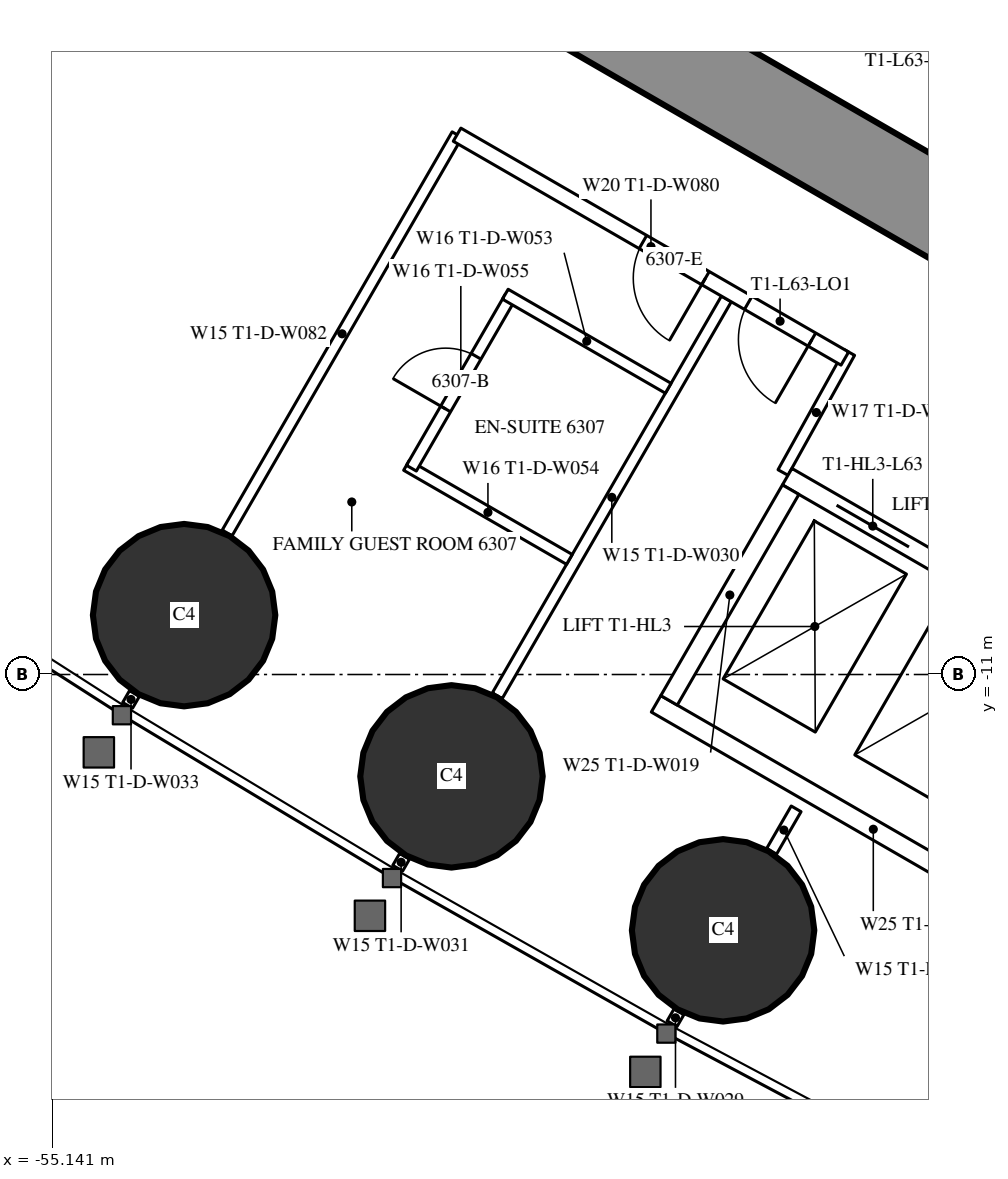
"""IFC4 building model, lengths in metres.
Left out: names, types, materials, properties, quantities, classifications, styles, units other than length and angle.
Written with IfcOpenShell. Run it as: python <this file> out.ifc"""

import sys

from ifc_helpers import new_model, si_unit, direction, frame, frame_2d, origin, origin_2d, place, context, subcontext, project, spatial, rectangle, circle, extrude, element, fill, save


model = new_model("IFC4")
c1 = context("Model", 3, precision=1e-05, world=origin(), true_north=direction((0.0, 1.0)))
c2 = subcontext(c1, "Body", "Model", "MODEL_VIEW")
j1 = project(units=[si_unit("LENGTHUNIT", "METRE"), si_unit("PLANEANGLEUNIT", "RADIAN")], contexts=[c1])
p1 = place(None, origin())
s1 = spatial("IfcSite", under=j1, at=p1, CompositionType="ELEMENT")
p2 = place(p1, origin())
s2 = spatial("IfcBuilding", under=s1, at=p2, CompositionType="ELEMENT")
p3 = place(p2, frame((0.0, 0.0, 236.9)))
s3 = spatial("IfcBuildingStorey", under=s2, at=p3, CompositionType="ELEMENT", Elevation=236.9)
for number, where, z_axis, x_axis in (
    (1, (-53.408, -10.219, 0.0), (0.0, 0.0, 1.0), (1.0, 0.0, 0.0)),
    (2, (-49.89, -12.34, 0.0), (0.0, 0.0, 1.0), (1.0, 0.0, 0.0)),
    (3, (-46.317, -14.365, 0.0), (0.0, 0.0, 1.0), (1.0, 0.0, 0.0)),
):
    element("IfcColumn", number, at=place(p3, frame(where, z_axis=z_axis, x_axis=x_axis)), inside=s3, PredefinedType="COLUMN", context=c2, shape_type="SweptSolid", body=[
        extrude(circle(Radius=1.2, at=origin_2d()), origin(), (0.0, 0.0, 1.0), 3.6),
    ])
p4 = place(p3, frame((-27.2, -14.3, 0.0), z_axis=(0.0, 0.0, 1.0), x_axis=(-0.866024021859, 0.500002393557, 0.0)))
e4 = element("IfcWall", 4, at=p4, inside=s3, PredefinedType="SHEAR", context=c2, shape_type="SweptSolid", body=[
    extrude(rectangle(XDim=27.907, YDim=1.2, at=frame_2d((13.954, 0.0))), origin(), (0.0, 0.0, 1.0), 3.6),
])
p5 = place(p4, frame((4.6, 0.0, 0.0)))
e5 = element("IfcOpeningElement", 5, at=p5, cuts=e4, PredefinedType="OPENING", context=c2, shape_type="SweptSolid", body=[
    extrude(rectangle(XDim=1.0, YDim=2.2, at=frame_2d((0.5, 1.1))), frame((0.0, 0.61, 0.0), z_axis=(0.0, -1.0, 0.0), x_axis=(1.0, 0.0, 0.0)), (0.0, 0.0, 1.0), 1.22),
])
p6 = place(p4, frame((13.395, 0.0, 0.0)))
e6 = element("IfcOpeningElement", 6, at=p6, cuts=e4, PredefinedType="OPENING", context=c2, shape_type="SweptSolid", body=[
    extrude(rectangle(XDim=1.8, YDim=2.2, at=frame_2d((0.9, 1.1))), frame((0.0, 0.61, 0.0), z_axis=(0.0, -1.0, 0.0), x_axis=(1.0, 0.0, 0.0)), (0.0, 0.0, 1.0), 1.22),
])
p7 = place(p3, frame((-46.898, -15.439, 0.0), z_axis=(0.0, 0.0, 1.0), x_axis=(-0.500232303069, -0.865891241997, 0.0)))
e7 = element("IfcWall", 7, at=p7, inside=s3, PredefinedType="PARTITIONING", context=c2, shape_type="SweptSolid", body=[
    extrude(rectangle(XDim=0.18, YDim=0.15, at=frame_2d((0.09, 0.0))), origin(), (0.0, 0.0, 1.0), 2.45),
])
p8 = place(p3, frame((-46.274, -6.059, 0.0), z_axis=(0.0, 0.0, 1.0), x_axis=(-0.500020471368, -0.866013584312, 0.0)))
e8 = element("IfcWall", 8, at=p8, inside=s3, PredefinedType="PARTITIONING", context=c2, shape_type="SweptSolid", body=[
    extrude(rectangle(XDim=6.028, YDim=0.15, at=frame_2d((3.014, 0.0))), origin(), (0.0, 0.0, 1.0), 2.45),
])
p9 = place(p3, frame((-50.508, -13.392, 0.0), z_axis=(0.0, 0.0, 1.0), x_axis=(-0.499644091975, -0.866230789891, 0.0)))
e9 = element("IfcWall", 9, at=p9, inside=s3, PredefinedType="PARTITIONING", context=c2, shape_type="SweptSolid", body=[
    extrude(rectangle(XDim=0.18, YDim=0.15, at=frame_2d((0.09, 0.0))), origin(), (0.0, 0.0, 1.0), 2.45),
])
p10 = place(p3, frame((-49.816, -3.898, 0.0), z_axis=(0.0, 0.0, 1.0), x_axis=(-0.500001913541, -0.866024298998, 0.0)))
e10 = element("IfcWall", 10, at=p10, inside=s3, PredefinedType="PARTITIONING", context=c2, shape_type="SweptSolid", body=[
    extrude(rectangle(XDim=6.05, YDim=0.15, at=frame_2d((3.025, 0.0))), origin(), (0.0, 0.0, 1.0), 2.45),
])
p11 = place(p3, frame((-54.061, -11.25, 0.0), z_axis=(0.0, 0.0, 1.0), x_axis=(-0.500391173478, -0.865799441849, 0.0)))
e11 = element("IfcWall", 11, at=p11, inside=s3, PredefinedType="PARTITIONING", context=c2, shape_type="SweptSolid", body=[
    extrude(rectangle(XDim=0.179, YDim=0.15, at=frame_2d((0.089, 0.0))), origin(), (0.0, 0.0, 1.0), 2.45),
])
p12 = place(p3, frame((-45.356, -12.767, 0.0), z_axis=(0.0, 0.0, 1.0), x_axis=(-0.499886366516, -0.866091000168, 0.0)))
e12 = element("IfcWall", 12, at=p12, inside=s3, PredefinedType="PARTITIONING", context=c2, shape_type="SweptSolid", body=[
    extrude(rectangle(XDim=0.645, YDim=0.15, at=frame_2d((0.322, 0.0))), origin(), (0.0, 0.0, 1.0), 3.35),
])
p13 = place(p3, frame((-44.652, -6.764, 0.0), z_axis=(0.0, 0.0, 1.0), x_axis=(-0.485424724123, -0.874278466629, 0.0)))
e13 = element("IfcWall", 13, at=p13, inside=s3, PredefinedType="PARTITIONING", context=c2, shape_type="SweptSolid", body=[
    extrude(rectangle(XDim=1.805, YDim=0.15, at=frame_2d((0.903, 0.0))), origin(), (0.0, 0.0, 1.0), 3.35),
])
p14 = place(p3, frame((-48.339, -9.486, 0.0), z_axis=(0.0, 0.0, 1.0), x_axis=(-0.866006523861, 0.500032699561, 0.0)))
e14 = element("IfcWall", 14, at=p14, inside=s3, PredefinedType="PARTITIONING", context=c2, shape_type="SweptSolid", body=[
    extrude(rectangle(XDim=2.475, YDim=0.15, at=frame_2d((1.237, 0.0))), origin(), (0.0, 0.0, 1.0), 3.35),
])
p15 = place(p3, frame((-49.117, -6.034, 0.0), z_axis=(0.0, 0.0, 1.0), x_axis=(-0.500006934395, -0.866021400173, 0.0)))
e15 = element("IfcWall", 15, at=p15, inside=s3, PredefinedType="PARTITIONING", context=c2, shape_type="SweptSolid", body=[
    extrude(rectangle(XDim=2.6, YDim=0.15, at=frame_2d((1.3, 0.0))), origin(), (0.0, 0.0, 1.0), 3.35),
])
p16 = place(p15, frame((0.9, 0.0, 0.0)))
e16 = element("IfcOpeningElement", 16, at=p16, cuts=e15, PredefinedType="OPENING", context=c2, shape_type="SweptSolid", body=[
    extrude(rectangle(XDim=0.8, YDim=2.2, at=frame_2d((0.4, 1.1))), frame((0.0, 0.085, 0.0), z_axis=(0.0, -1.0, 0.0), x_axis=(1.0, 0.0, 0.0)), (0.0, 0.0, 1.0), 0.17),
])
p17 = place(p3, frame((-47.039, -7.234, 0.0), z_axis=(0.0, 0.0, 1.0), x_axis=(-0.866073894602, 0.499916002032, 0.0)))
e17 = element("IfcWall", 17, at=p17, inside=s3, PredefinedType="PARTITIONING", context=c2, shape_type="SweptSolid", body=[
    extrude(rectangle(XDim=2.475, YDim=0.15, at=frame_2d((1.238, 0.0))), origin(), (0.0, 0.0, 1.0), 2.5),
])
p18 = place(p3, frame((-44.715, -6.844, 0.0), z_axis=(0.0, 0.0, 1.0), x_axis=(-0.866020627653, 0.50000827241, 0.0)))
e18 = element("IfcWall", 18, at=p18, inside=s3, PredefinedType="PARTITIONING", context=c2, shape_type="SweptSolid", body=[
    extrude(rectangle(XDim=5.891, YDim=0.2, at=frame_2d((2.945, 0.0))), origin(), (0.0, 0.0, 1.0), 3.35),
])
p19 = place(p18, frame((2.117, 0.0, 0.0)))
e19 = element("IfcOpeningElement", 19, at=p19, cuts=e18, PredefinedType="OPENING", context=c2, shape_type="SweptSolid", body=[
    extrude(rectangle(XDim=0.95, YDim=2.2, at=frame_2d((0.475, 1.1))), frame((0.0, 0.11, 0.0), z_axis=(0.0, -1.0, 0.0), x_axis=(1.0, 0.0, 0.0)), (0.0, 0.0, 1.0), 0.22),
])
p20 = place(p18, frame((0.5, 0.0, 0.0)))
e20 = element("IfcOpeningElement", 20, at=p20, cuts=e18, PredefinedType="OPENING", context=c2, shape_type="SweptSolid", body=[
    extrude(rectangle(XDim=0.967, YDim=2.2, at=frame_2d((0.483, 1.1))), frame((0.0, 0.11, 0.0), z_axis=(0.0, -1.0, 0.0), x_axis=(1.0, 0.0, 0.0)), (0.0, 0.0, 1.0), 0.22),
])
p21 = place(p3, frame((-39.758, -11.697, 0.0), z_axis=(0.0, 0.0, 1.0), x_axis=(-0.866024194504, 0.500002094529, 0.0)))
e21 = element("IfcWall", 21, at=p21, inside=s3, PredefinedType="PARTITIONING", context=c2, shape_type="SweptSolid", body=[
    extrude(rectangle(XDim=6.6, YDim=0.25, at=frame_2d((3.3, 0.0))), origin(), (0.0, 0.0, 1.0), 3.35),
])
p22 = place(p21, frame((0.75, 0.0, 0.0)))
e22 = element("IfcOpeningElement", 22, at=p22, cuts=e21, PredefinedType="OPENING", context=c2, shape_type="SweptSolid", body=[
    extrude(rectangle(XDim=1.1, YDim=2.2, at=frame_2d((0.55, 1.1))), frame((0.0, 0.135, 0.0), z_axis=(0.0, -1.0, 0.0), x_axis=(1.0, 0.0, 0.0)), (0.0, 0.0, 1.0), 0.27),
])
p23 = place(p21, frame((2.75, 0.0, 0.0)))
e23 = element("IfcOpeningElement", 23, at=p23, cuts=e21, PredefinedType="OPENING", context=c2, shape_type="SweptSolid", body=[
    extrude(rectangle(XDim=1.1, YDim=2.2, at=frame_2d((0.55, 1.1))), frame((0.0, 0.135, 0.0), z_axis=(0.0, -1.0, 0.0), x_axis=(1.0, 0.0, 0.0)), (0.0, 0.0, 1.0), 0.27),
])
p24 = place(p21, frame((4.75, 0.0, 0.0)))
e24 = element("IfcOpeningElement", 24, at=p24, cuts=e21, PredefinedType="OPENING", context=c2, shape_type="SweptSolid", body=[
    extrude(rectangle(XDim=1.1, YDim=2.2, at=frame_2d((0.55, 1.1))), frame((0.0, 0.135, 0.0), z_axis=(0.0, -1.0, 0.0), x_axis=(1.0, 0.0, 0.0)), (0.0, 0.0, 1.0), 0.27),
])
p25 = place(p3, frame((-41.482, -14.686, 0.0), z_axis=(0.0, 0.0, 1.0), x_axis=(-0.86603344179, 0.499986077507, 0.0)))
e25 = element("IfcWall", 25, at=p25, inside=s3, PredefinedType="PARTITIONING", context=c2, shape_type="SweptSolid", body=[
    extrude(rectangle(XDim=6.6, YDim=0.25, at=frame_2d((3.3, 0.0))), origin(), (0.0, 0.0, 1.0), 3.35),
])
p26 = place(p3, frame((-45.428, -8.568, 0.0), z_axis=(0.0, 0.0, 1.0), x_axis=(-0.499929347863, -0.866066190972, 0.0)))
e26 = element("IfcWall", 26, at=p26, inside=s3, PredefinedType="PARTITIONING", context=c2, shape_type="SweptSolid", body=[
    extrude(rectangle(XDim=3.201, YDim=0.25, at=frame_2d((1.6, 0.0))), origin(), (0.0, 0.0, 1.0), 3.35),
])
p27 = place(p16, origin())
e27 = element("IfcDoor", 27, at=p27, inside=s3, OperationType="SINGLE_SWING_RIGHT", PredefinedType="DOOR", context=c2, shape_type="SweptSolid", body=[
    extrude(rectangle(XDim=0.8, YDim=2.2, at=frame_2d((0.4, 1.1))), frame((0.0, 0.025, 0.0), z_axis=(0.0, -1.0, 0.0), x_axis=(1.0, 0.0, 0.0)), (0.0, 0.0, 1.0), 0.05),
])
fill(e16, e27)
p28 = place(p19, origin())
e28 = element("IfcDoor", 28, at=p28, inside=s3, OperationType="SINGLE_SWING_LEFT", PredefinedType="DOOR", context=c2, shape_type="SweptSolid", body=[
    extrude(rectangle(XDim=0.95, YDim=2.2, at=frame_2d((0.475, 1.1))), frame((0.0, 0.025, 0.0), z_axis=(0.0, -1.0, 0.0), x_axis=(1.0, 0.0, 0.0)), (0.0, 0.0, 1.0), 0.05),
])
fill(e19, e28)
p29 = place(p20, origin())
e29 = element("IfcDoor", 29, at=p29, inside=s3, OperationType="SINGLE_SWING_LEFT", PredefinedType="DOOR", context=c2, shape_type="SweptSolid", body=[
    extrude(rectangle(XDim=0.967, YDim=2.2, at=frame_2d((0.483, 1.1))), frame((0.0, 0.025, 0.0), z_axis=(0.0, -1.0, 0.0), x_axis=(1.0, 0.0, 0.0)), (0.0, 0.0, 1.0), 0.05),
])
fill(e20, e29)
p30 = place(p24, origin())
e30 = element("IfcDoor", 30, at=p30, inside=s3, OperationType="DOUBLE_DOOR_SLIDING", PredefinedType="USERDEFINED", context=c2, shape_type="SweptSolid", body=[
    extrude(rectangle(XDim=1.1, YDim=2.2, at=frame_2d((0.55, 1.1))), frame((0.0, 0.025, 0.0), z_axis=(0.0, -1.0, 0.0), x_axis=(1.0, 0.0, 0.0)), (0.0, 0.0, 1.0), 0.05),
])
fill(e24, e30)
save(model, sys.argv[1])
